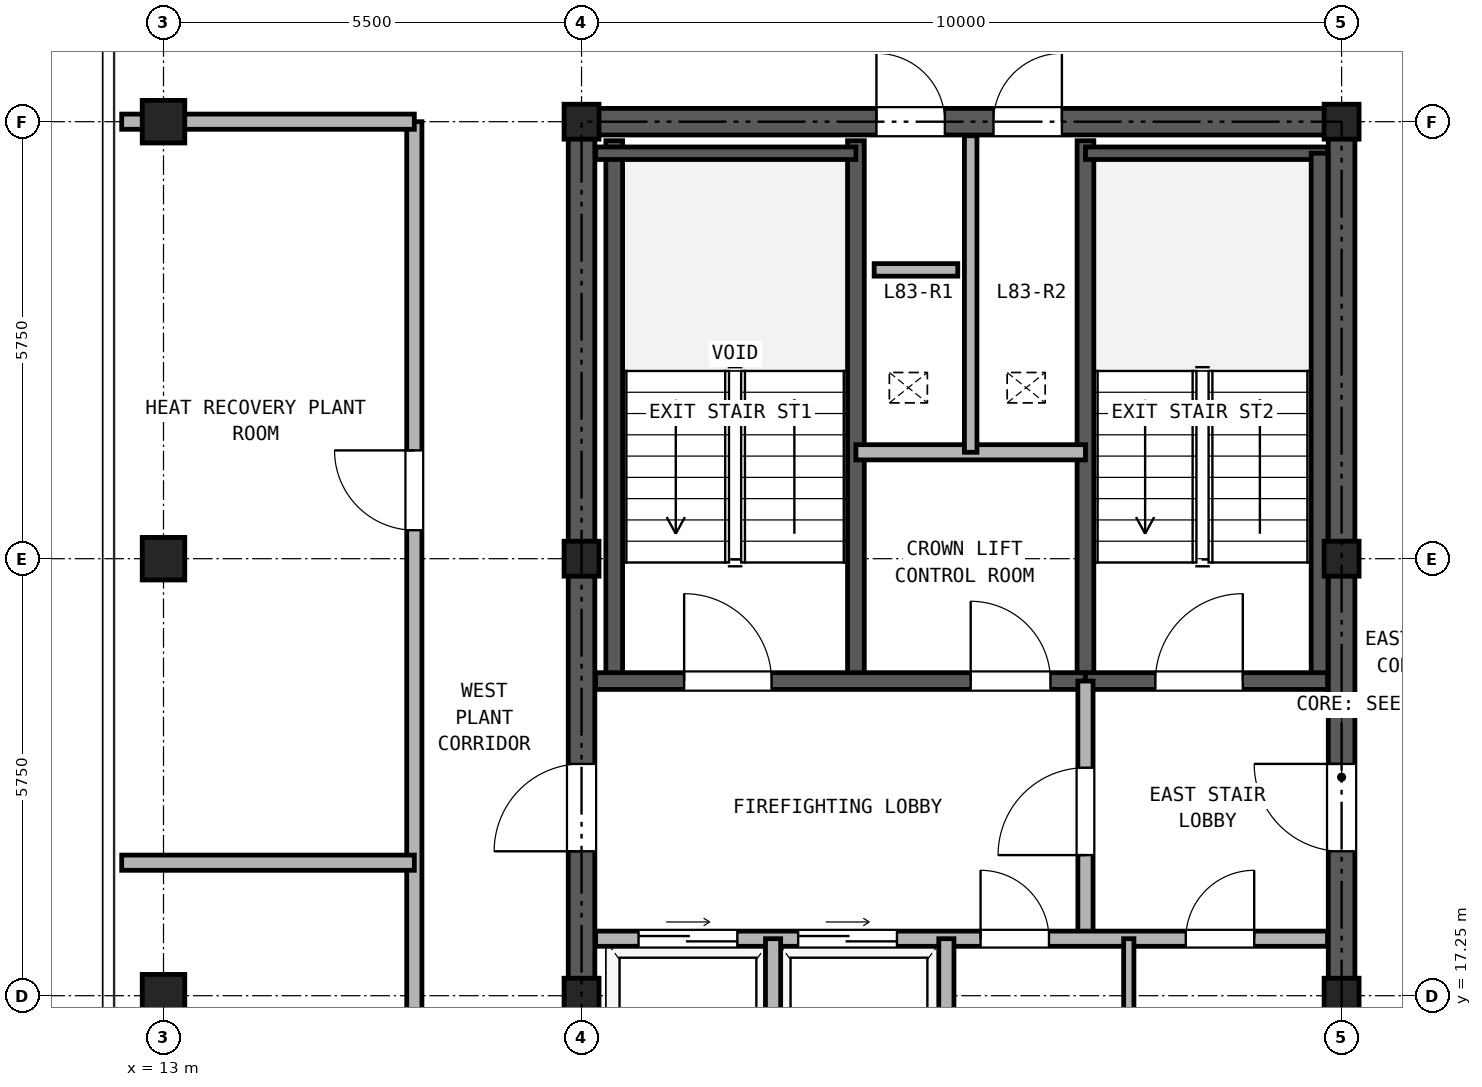
"""IFC4 building model, lengths in metres.
Left out: names, types, materials, properties, quantities, classifications, styles, units other than length and angle.
Written with IfcOpenShell. Run it as: python <this file> out.ifc"""

import sys

from ifc_helpers import new_model, si_unit, direction, frame, frame_2d, origin, origin_2d, place, context, subcontext, project, spatial, rectangle, hollow_rectangle, extrude, source, transform, mapped, element, fill, save


model = new_model("IFC4")
c1 = context("Model", 3, precision=1e-05, world=origin(), true_north=direction((0.0, 1.0)))
c2 = subcontext(c1, "Body", "Model", "MODEL_VIEW")
j1 = project(units=[si_unit("LENGTHUNIT", "METRE"), si_unit("PLANEANGLEUNIT", "RADIAN")], contexts=[c1])
p1 = place(None, origin())
s1 = spatial("IfcSite", under=j1, at=p1, CompositionType="ELEMENT")
p2 = place(p1, origin())
s2 = spatial("IfcBuilding", under=s1, at=p2, CompositionType="ELEMENT")
p3 = place(p2, frame((0.0, 0.0, 289.3)))
s3 = spatial("IfcBuildingStorey", under=s2, at=p3, CompositionType="ELEMENT", Elevation=289.3)
m1 = source(origin(), c2, "Body", "SweptSolid", [
    extrude(hollow_rectangle(XDim=0.56, YDim=0.56, WallThickness=0.03, at=origin_2d()), origin(), (0.0, 0.0, 1.0), 3.38),
])
for number, where, z_axis, x_axis in (
    (1, (13.0, 17.25, 0.0), (0.0, 0.0, 1.0), (1.0, 0.0, 0.0)),
    (2, (13.0, 23.0, 0.0), (0.0, 0.0, 1.0), (1.0, 0.0, 0.0)),
    (3, (13.0, 28.75, 0.0), (0.0, 0.0, 1.0), (1.0, 0.0, 0.0)),
):
    element("IfcColumn", number, at=place(p3, frame(where, z_axis=z_axis, x_axis=x_axis)), inside=s3, PredefinedType="COLUMN", context=c2, shape_type="MappedRepresentation", body=[
        mapped(m1, transform((0.0, 0.0, 0.0), x_axis=(1.0, 0.0, 0.0), y_axis=(0.0, 1.0, 0.0), z_axis=(0.0, 0.0, 1.0), scale=1.0)),
    ])
m2 = source(origin(), c2, "Body", "SweptSolid", [
    extrude(hollow_rectangle(XDim=0.46, YDim=0.46, WallThickness=0.025, at=origin_2d()), origin(), (0.0, 0.0, 1.0), 3.38),
])
for number, where, z_axis, x_axis in (
    (4, (18.5, 17.25, 0.0), (0.0, 0.0, 1.0), (1.0, 0.0, 0.0)),
    (5, (18.5, 23.0, 0.0), (0.0, 0.0, 1.0), (1.0, 0.0, 0.0)),
    (6, (18.5, 28.75, 0.0), (0.0, 0.0, 1.0), (1.0, 0.0, 0.0)),
    (7, (28.5, 17.25, 0.0), (0.0, 0.0, 1.0), (1.0, 0.0, 0.0)),
    (8, (28.5, 23.0, 0.0), (0.0, 0.0, 1.0), (1.0, 0.0, 0.0)),
    (9, (28.5, 28.75, 0.0), (0.0, 0.0, 1.0), (1.0, 0.0, 0.0)),
):
    element("IfcColumn", number, at=place(p3, frame(where, z_axis=z_axis, x_axis=x_axis)), inside=s3, PredefinedType="COLUMN", context=c2, shape_type="MappedRepresentation", body=[
        mapped(m2, transform((0.0, 0.0, 0.0), x_axis=(1.0, 0.0, 0.0), y_axis=(0.0, 1.0, 0.0), z_axis=(0.0, 0.0, 1.0), scale=1.0)),
    ])
p4 = place(p3, frame((18.325, 28.75, 0.0), z_axis=(0.0, 0.0, 1.0), x_axis=(1.0, 0.0, 0.0)))
e10 = element("IfcWall", 10, at=p4, inside=s3, PredefinedType="SHEAR", context=c2, shape_type="SweptSolid", body=[
    extrude(rectangle(XDim=10.35, YDim=0.35, at=frame_2d((5.175, 0.0))), origin(), (0.0, 0.0, 1.0), 3.38),
])
p5 = place(p4, frame((4.055, 0.0, 0.0)))
e11 = element("IfcOpeningElement", 11, at=p5, cuts=e10, PredefinedType="OPENING", context=c2, shape_type="SweptSolid", body=[
    extrude(rectangle(XDim=0.9, YDim=2.05, at=frame_2d((0.45, 1.025))), frame((0.0, 0.185, 0.0), z_axis=(0.0, -1.0, 0.0), x_axis=(1.0, 0.0, 0.0)), (0.0, 0.0, 1.0), 0.37),
])
p6 = place(p4, frame((5.595, 0.0, 0.0)))
e12 = element("IfcOpeningElement", 12, at=p6, cuts=e10, PredefinedType="OPENING", context=c2, shape_type="SweptSolid", body=[
    extrude(rectangle(XDim=0.9, YDim=2.05, at=frame_2d((0.45, 1.025))), frame((0.0, 0.185, 0.0), z_axis=(0.0, -1.0, 0.0), x_axis=(1.0, 0.0, 0.0)), (0.0, 0.0, 1.0), 0.37),
])
p7 = place(p3, frame((18.5, 11.675, 0.0), z_axis=(0.0, 0.0, 1.0), x_axis=(0.0, 1.0, 0.0)))
e13 = element("IfcWall", 13, at=p7, inside=s3, PredefinedType="SHEAR", context=c2, shape_type="SweptSolid", body=[
    extrude(rectangle(XDim=16.9, YDim=0.35, at=frame_2d((8.45, 0.0))), origin(), (0.0, 0.0, 1.0), 3.38),
])
p8 = place(p7, frame((7.475, 0.0, 0.0)))
e14 = element("IfcOpeningElement", 14, at=p8, cuts=e13, PredefinedType="OPENING", context=c2, shape_type="SweptSolid", body=[
    extrude(rectangle(XDim=1.15, YDim=2.2, at=frame_2d((0.575, 1.1))), frame((0.0, 0.185, 0.0), z_axis=(0.0, -1.0, 0.0), x_axis=(1.0, 0.0, 0.0)), (0.0, 0.0, 1.0), 0.37),
])
p9 = place(p3, frame((28.5, 11.675, 0.0), z_axis=(0.0, 0.0, 1.0), x_axis=(0.0, 1.0, 0.0)))
e15 = element("IfcWall", 15, at=p9, inside=s3, PredefinedType="SHEAR", context=c2, shape_type="SweptSolid", body=[
    extrude(rectangle(XDim=16.9, YDim=0.35, at=frame_2d((8.45, 0.0))), origin(), (0.0, 0.0, 1.0), 3.38),
])
p10 = place(p9, frame((7.475, 0.0, 0.0)))
e16 = element("IfcOpeningElement", 16, at=p10, cuts=e15, PredefinedType="OPENING", context=c2, shape_type="SweptSolid", body=[
    extrude(rectangle(XDim=1.15, YDim=2.2, at=frame_2d((0.575, 1.1))), frame((0.0, 0.185, 0.0), z_axis=(0.0, -1.0, 0.0), x_axis=(1.0, 0.0, 0.0)), (0.0, 0.0, 1.0), 0.37),
])
for number, where, z_axis, x_axis in (
    (17, (18.93, 21.39, 0.0), (0.0, 0.0, 1.0), (0.0, 1.0, 0.0)),
    (18, (22.11, 21.39, 0.0), (0.0, 0.0, 1.0), (0.0, 1.0, 0.0)),
    (19, (25.13, 21.39, 0.0), (0.0, 0.0, 1.0), (0.0, 1.0, 0.0)),
):
    element("IfcWall", number, at=place(p3, frame(where, z_axis=z_axis, x_axis=x_axis)), inside=s3, PredefinedType="SOLIDWALL", context=c2, shape_type="SweptSolid", body=[
        extrude(rectangle(XDim=7.11, YDim=0.22, at=frame_2d((3.555, 0.0))), origin(), (0.0, 0.0, 1.0), 3.38),
    ])
p11 = place(p3, frame((18.685, 28.335, 0.0), z_axis=(0.0, 0.0, 1.0), x_axis=(1.0, 0.0, 0.0)))
e20 = element("IfcWall", 20, at=p11, inside=s3, PredefinedType="PARTITIONING", context=c2, shape_type="SweptSolid", body=[
    extrude(rectangle(XDim=3.425, YDim=0.165, at=frame_2d((1.712, 0.0))), origin(), (0.0, 0.0, 1.0), 3.38),
])
p12 = place(p3, frame((25.13, 28.335, 0.0), z_axis=(0.0, 0.0, 1.0), x_axis=(1.0, 0.0, 0.0)))
e21 = element("IfcWall", 21, at=p12, inside=s3, PredefinedType="PARTITIONING", context=c2, shape_type="SweptSolid", body=[
    extrude(rectangle(XDim=3.185, YDim=0.165, at=frame_2d((1.593, 0.0))), origin(), (0.0, 0.0, 1.0), 3.38),
])
p13 = place(p3, frame((28.21, 21.39, 0.0), z_axis=(0.0, 0.0, 1.0), x_axis=(0.0, 1.0, 0.0)))
e22 = element("IfcWall", 22, at=p13, inside=s3, PredefinedType="SOLIDWALL", context=c2, shape_type="SweptSolid", body=[
    extrude(rectangle(XDim=6.945, YDim=0.22, at=frame_2d((3.473, 0.0))), origin(), (0.0, 0.0, 1.0), 3.38),
])
p14 = place(p3, frame((18.685, 21.39, 0.0), z_axis=(0.0, 0.0, 1.0), x_axis=(1.0, 0.0, 0.0)))
e23 = element("IfcWall", 23, at=p14, inside=s3, PredefinedType="SOLIDWALL", context=c2, shape_type="SweptSolid", body=[
    extrude(rectangle(XDim=6.445, YDim=0.22, at=frame_2d((3.222, 0.0))), origin(), (0.0, 0.0, 1.0), 3.38),
])
p15 = place(p14, frame((1.165, 0.0, 0.0)))
e24 = element("IfcOpeningElement", 24, at=p15, cuts=e23, PredefinedType="OPENING", context=c2, shape_type="SweptSolid", body=[
    extrude(rectangle(XDim=1.15, YDim=2.2, at=frame_2d((0.575, 1.1))), frame((0.0, 0.12, 0.0), z_axis=(0.0, -1.0, 0.0), x_axis=(1.0, 0.0, 0.0)), (0.0, 0.0, 1.0), 0.24),
])
p16 = place(p14, frame((4.935, 0.0, 0.0)))
e25 = element("IfcOpeningElement", 25, at=p16, cuts=e23, PredefinedType="OPENING", context=c2, shape_type="SweptSolid", body=[
    extrude(rectangle(XDim=1.05, YDim=2.15, at=frame_2d((0.525, 1.075))), frame((0.0, 0.12, 0.0), z_axis=(0.0, -1.0, 0.0), x_axis=(1.0, 0.0, 0.0)), (0.0, 0.0, 1.0), 0.24),
])
p17 = place(p3, frame((25.13, 21.39, 0.0), z_axis=(0.0, 0.0, 1.0), x_axis=(1.0, 0.0, 0.0)))
e26 = element("IfcWall", 26, at=p17, inside=s3, PredefinedType="SOLIDWALL", context=c2, shape_type="SweptSolid", body=[
    extrude(rectangle(XDim=3.185, YDim=0.22, at=frame_2d((1.593, 0.0))), origin(), (0.0, 0.0, 1.0), 3.38),
])
p18 = place(p17, frame((0.92, 0.0, 0.0)))
e27 = element("IfcOpeningElement", 27, at=p18, cuts=e26, PredefinedType="OPENING", context=c2, shape_type="SweptSolid", body=[
    extrude(rectangle(XDim=1.15, YDim=2.2, at=frame_2d((0.575, 1.1))), frame((0.0, 0.12, 0.0), z_axis=(0.0, -1.0, 0.0), x_axis=(1.0, 0.0, 0.0)), (0.0, 0.0, 1.0), 0.24),
])
p19 = place(p3, frame((22.11, 24.4, 0.0), z_axis=(0.0, 0.0, 1.0), x_axis=(1.0, 0.0, 0.0)))
e28 = element("IfcWall", 28, at=p19, inside=s3, PredefinedType="PARTITIONING", context=c2, shape_type="SweptSolid", body=[
    extrude(rectangle(XDim=3.02, YDim=0.2, at=frame_2d((1.51, 0.0))), origin(), (0.0, 0.0, 1.0), 3.38),
])
p20 = place(p3, frame((23.62, 24.4, 0.0), z_axis=(0.0, 0.0, 1.0), x_axis=(0.0, 1.0, 0.0)))
e29 = element("IfcWall", 29, at=p20, inside=s3, PredefinedType="PARTITIONING", context=c2, shape_type="SweptSolid", body=[
    extrude(rectangle(XDim=4.165, YDim=0.165, at=frame_2d((2.083, 0.0))), origin(), (0.0, 0.0, 1.0), 3.38),
])
p21 = place(p3, frame((25.13, 18.0, 0.0), z_axis=(0.0, 0.0, 1.0), x_axis=(0.0, 1.0, 0.0)))
e30 = element("IfcWall", 30, at=p21, inside=s3, PredefinedType="PARTITIONING", context=c2, shape_type="SweptSolid", body=[
    extrude(rectangle(XDim=3.39, YDim=0.2, at=frame_2d((1.695, 0.0))), origin(), (0.0, 0.0, 1.0), 3.38),
])
p22 = place(p21, frame((1.1, 0.0, 0.0)))
e31 = element("IfcOpeningElement", 31, at=p22, cuts=e30, PredefinedType="OPENING", context=c2, shape_type="SweptSolid", body=[
    extrude(rectangle(XDim=1.15, YDim=2.2, at=frame_2d((0.575, 1.1))), frame((0.0, 0.11, 0.0), z_axis=(0.0, -1.0, 0.0), x_axis=(1.0, 0.0, 0.0)), (0.0, 0.0, 1.0), 0.22),
])
p23 = place(p3, frame((18.685, 18.0, 0.0), z_axis=(0.0, 0.0, 1.0), x_axis=(1.0, 0.0, 0.0)))
e32 = element("IfcWall", 32, at=p23, inside=s3, PredefinedType="PARTITIONING", context=c2, shape_type="SweptSolid", body=[
    extrude(rectangle(XDim=9.63, YDim=0.2, at=frame_2d((4.815, 0.0))), origin(), (0.0, 0.0, 1.0), 3.38),
])
p24 = place(p23, frame((0.565, 0.0, 0.0)))
e33 = element("IfcOpeningElement", 33, at=p24, cuts=e32, PredefinedType="OPENING", context=c2, shape_type="SweptSolid", body=[
    extrude(rectangle(XDim=1.3, YDim=2.3, at=frame_2d((0.65, 1.15))), frame((0.0, 0.11, 0.0), z_axis=(0.0, -1.0, 0.0), x_axis=(1.0, 0.0, 0.0)), (0.0, 0.0, 1.0), 0.22),
])
p25 = place(p23, frame((2.665, 0.0, 0.0)))
e34 = element("IfcOpeningElement", 34, at=p25, cuts=e32, PredefinedType="OPENING", context=c2, shape_type="SweptSolid", body=[
    extrude(rectangle(XDim=1.3, YDim=2.3, at=frame_2d((0.65, 1.15))), frame((0.0, 0.11, 0.0), z_axis=(0.0, -1.0, 0.0), x_axis=(1.0, 0.0, 0.0)), (0.0, 0.0, 1.0), 0.22),
])
p26 = place(p23, frame((5.065, 0.0, 0.0)))
e35 = element("IfcOpeningElement", 35, at=p26, cuts=e32, PredefinedType="OPENING", context=c2, shape_type="SweptSolid", body=[
    extrude(rectangle(XDim=0.9, YDim=2.05, at=frame_2d((0.45, 1.025))), frame((0.0, 0.11, 0.0), z_axis=(0.0, -1.0, 0.0), x_axis=(1.0, 0.0, 0.0)), (0.0, 0.0, 1.0), 0.22),
])
p27 = place(p23, frame((7.765, 0.0, 0.0)))
e36 = element("IfcOpeningElement", 36, at=p27, cuts=e32, PredefinedType="OPENING", context=c2, shape_type="SweptSolid", body=[
    extrude(rectangle(XDim=0.9, YDim=2.05, at=frame_2d((0.45, 1.025))), frame((0.0, 0.11, 0.0), z_axis=(0.0, -1.0, 0.0), x_axis=(1.0, 0.0, 0.0)), (0.0, 0.0, 1.0), 0.22),
])
for number, where, z_axis, x_axis in (
    (37, (21.02, 15.0, 0.0), (0.0, 0.0, 1.0), (0.0, 1.0, 0.0)),
    (38, (23.3, 15.0, 0.0), (0.0, 0.0, 1.0), (0.0, 1.0, 0.0)),
):
    element("IfcWall", number, at=place(p3, frame(where, z_axis=z_axis, x_axis=x_axis)), inside=s3, PredefinedType="PARTITIONING", context=c2, shape_type="SweptSolid", body=[
        extrude(rectangle(XDim=3.0, YDim=0.2, at=frame_2d((1.5, 0.0))), origin(), (0.0, 0.0, 1.0), 3.38),
    ])
p28 = place(p3, frame((25.7, 15.0, 0.0), z_axis=(0.0, 0.0, 1.0), x_axis=(0.0, 1.0, 0.0)))
e39 = element("IfcWall", 39, at=p28, inside=s3, PredefinedType="PARTITIONING", context=c2, shape_type="SweptSolid", body=[
    extrude(rectangle(XDim=3.0, YDim=0.135, at=frame_2d((1.5, 0.0))), origin(), (0.0, 0.0, 1.0), 3.38),
])
p29 = place(p3, frame((16.3, 8.9, 0.0), z_axis=(0.0, 0.0, 1.0), x_axis=(0.0, 1.0, 0.0)))
e40 = element("IfcWall", 40, at=p29, inside=s3, PredefinedType="PARTITIONING", context=c2, shape_type="SweptSolid", body=[
    extrude(rectangle(XDim=19.85, YDim=0.2, at=frame_2d((9.925, 0.0))), origin(), (0.0, 0.0, 1.0), 3.38),
])
p30 = place(p29, frame((4.55, 0.0, 0.0)))
e41 = element("IfcOpeningElement", 41, at=p30, cuts=e40, PredefinedType="OPENING", context=c2, shape_type="SweptSolid", body=[
    extrude(rectangle(XDim=1.05, YDim=2.15, at=frame_2d((0.525, 1.075))), frame((0.0, 0.11, 0.0), z_axis=(0.0, -1.0, 0.0), x_axis=(1.0, 0.0, 0.0)), (0.0, 0.0, 1.0), 0.22),
])
p31 = place(p29, frame((14.475, 0.0, 0.0)))
e42 = element("IfcOpeningElement", 42, at=p31, cuts=e40, PredefinedType="OPENING", context=c2, shape_type="SweptSolid", body=[
    extrude(rectangle(XDim=1.05, YDim=2.15, at=frame_2d((0.525, 1.075))), frame((0.0, 0.11, 0.0), z_axis=(0.0, -1.0, 0.0), x_axis=(1.0, 0.0, 0.0)), (0.0, 0.0, 1.0), 0.22),
])
p32 = place(p3, frame((12.45, 28.75, 0.0), z_axis=(0.0, 0.0, 1.0), x_axis=(1.0, 0.0, 0.0)))
e43 = element("IfcWall", 43, at=p32, inside=s3, PredefinedType="PARTITIONING", context=c2, shape_type="SweptSolid", body=[
    extrude(rectangle(XDim=3.85, YDim=0.2, at=frame_2d((1.925, 0.0))), origin(), (0.0, 0.0, 1.0), 2.905),
])
p33 = place(p3, frame((12.45, 19.0, 0.0), z_axis=(0.0, 0.0, 1.0), x_axis=(1.0, 0.0, 0.0)))
e44 = element("IfcWall", 44, at=p33, inside=s3, PredefinedType="PARTITIONING", context=c2, shape_type="SweptSolid", body=[
    extrude(rectangle(XDim=3.85, YDim=0.2, at=frame_2d((1.925, 0.0))), origin(), (0.0, 0.0, 1.0), 3.38),
])
p34 = place(p3, frame((22.35, 26.8, 0.0), z_axis=(0.0, 0.0, 1.0), x_axis=(1.0, 0.0, 0.0)))
e45 = element("IfcWall", 45, at=p34, inside=s3, PredefinedType="PARTITIONING", context=c2, shape_type="SweptSolid", body=[
    extrude(rectangle(XDim=1.1, YDim=0.165, at=frame_2d((0.55, 0.0))), origin(), (0.0, 0.0, 1.0), 3.38),
])
p35 = place(p15, frame((1.15, 0.0, 0.0), z_axis=(0.0, 0.0, 1.0), x_axis=(-1.0, 0.0, 0.0)))
e46 = element("IfcDoor", 46, at=p35, inside=s3, OperationType="SINGLE_SWING_LEFT", PredefinedType="DOOR", context=c2, shape_type="SweptSolid", body=[
    extrude(rectangle(XDim=1.15, YDim=2.2, at=frame_2d((0.575, 1.1))), frame((0.0, 0.025, 0.0), z_axis=(0.0, -1.0, 0.0), x_axis=(1.0, 0.0, 0.0)), (0.0, 0.0, 1.0), 0.05),
])
fill(e24, e46)
p36 = place(p18, frame((1.15, 0.0, 0.0), z_axis=(0.0, 0.0, 1.0), x_axis=(-1.0, 0.0, 0.0)))
e47 = element("IfcDoor", 47, at=p36, inside=s3, OperationType="SINGLE_SWING_RIGHT", PredefinedType="DOOR", context=c2, shape_type="SweptSolid", body=[
    extrude(rectangle(XDim=1.15, YDim=2.2, at=frame_2d((0.575, 1.1))), frame((0.0, 0.025, 0.0), z_axis=(0.0, -1.0, 0.0), x_axis=(1.0, 0.0, 0.0)), (0.0, 0.0, 1.0), 0.05),
])
fill(e27, e47)
p37 = place(p16, origin())
e48 = element("IfcDoor", 48, at=p37, inside=s3, OperationType="SINGLE_SWING_LEFT", PredefinedType="DOOR", context=c2, shape_type="SweptSolid", body=[
    extrude(rectangle(XDim=1.05, YDim=2.15, at=frame_2d((0.525, 1.075))), frame((0.0, 0.025, 0.0), z_axis=(0.0, -1.0, 0.0), x_axis=(1.0, 0.0, 0.0)), (0.0, 0.0, 1.0), 0.05),
])
fill(e25, e48)
p38 = place(p22, origin())
e49 = element("IfcDoor", 49, at=p38, inside=s3, OperationType="SINGLE_SWING_LEFT", PredefinedType="DOOR", context=c2, shape_type="SweptSolid", body=[
    extrude(rectangle(XDim=1.15, YDim=2.2, at=frame_2d((0.575, 1.1))), frame((0.0, 0.025, 0.0), z_axis=(0.0, -1.0, 0.0), x_axis=(1.0, 0.0, 0.0)), (0.0, 0.0, 1.0), 0.05),
])
fill(e31, e49)
p39 = place(p24, origin())
e50 = element("IfcDoor", 50, at=p39, inside=s3, OperationType="DOUBLE_DOOR_SLIDING", PredefinedType="DOOR", context=c2, shape_type="SweptSolid", body=[
    extrude(rectangle(XDim=1.3, YDim=2.3, at=frame_2d((0.65, 1.15))), frame((0.0, 0.025, 0.0), z_axis=(0.0, -1.0, 0.0), x_axis=(1.0, 0.0, 0.0)), (0.0, 0.0, 1.0), 0.05),
])
fill(e33, e50)
p40 = place(p25, origin())
e51 = element("IfcDoor", 51, at=p40, inside=s3, OperationType="DOUBLE_DOOR_SLIDING", PredefinedType="DOOR", context=c2, shape_type="SweptSolid", body=[
    extrude(rectangle(XDim=1.3, YDim=2.3, at=frame_2d((0.65, 1.15))), frame((0.0, 0.025, 0.0), z_axis=(0.0, -1.0, 0.0), x_axis=(1.0, 0.0, 0.0)), (0.0, 0.0, 1.0), 0.05),
])
fill(e34, e51)
p41 = place(p26, frame((0.9, 0.0, 0.0), z_axis=(0.0, 0.0, 1.0), x_axis=(-1.0, 0.0, 0.0)))
e52 = element("IfcDoor", 52, at=p41, inside=s3, OperationType="SINGLE_SWING_LEFT", PredefinedType="DOOR", context=c2, shape_type="SweptSolid", body=[
    extrude(rectangle(XDim=0.9, YDim=2.05, at=frame_2d((0.45, 1.025))), frame((0.0, 0.025, 0.0), z_axis=(0.0, -1.0, 0.0), x_axis=(1.0, 0.0, 0.0)), (0.0, 0.0, 1.0), 0.05),
])
fill(e35, e52)
p42 = place(p27, frame((0.9, 0.0, 0.0), z_axis=(0.0, 0.0, 1.0), x_axis=(-1.0, 0.0, 0.0)))
e53 = element("IfcDoor", 53, at=p42, inside=s3, OperationType="SINGLE_SWING_RIGHT", PredefinedType="DOOR", context=c2, shape_type="SweptSolid", body=[
    extrude(rectangle(XDim=0.9, YDim=2.05, at=frame_2d((0.45, 1.025))), frame((0.0, 0.025, 0.0), z_axis=(0.0, -1.0, 0.0), x_axis=(1.0, 0.0, 0.0)), (0.0, 0.0, 1.0), 0.05),
])
fill(e36, e53)
p43 = place(p8, frame((1.15, 0.0, 0.0), z_axis=(0.0, 0.0, 1.0), x_axis=(-1.0, 0.0, 0.0)))
e54 = element("IfcDoor", 54, at=p43, inside=s3, OperationType="SINGLE_SWING_LEFT", PredefinedType="DOOR", context=c2, shape_type="SweptSolid", body=[
    extrude(rectangle(XDim=1.15, YDim=2.2, at=frame_2d((0.575, 1.1))), frame((0.0, 0.025, 0.0), z_axis=(0.0, -1.0, 0.0), x_axis=(1.0, 0.0, 0.0)), (0.0, 0.0, 1.0), 0.05),
])
fill(e14, e54)
p44 = place(p10, origin())
e55 = element("IfcDoor", 55, at=p44, inside=s3, OperationType="SINGLE_SWING_RIGHT", PredefinedType="DOOR", context=c2, shape_type="SweptSolid", body=[
    extrude(rectangle(XDim=1.15, YDim=2.2, at=frame_2d((0.575, 1.1))), frame((0.0, 0.025, 0.0), z_axis=(0.0, -1.0, 0.0), x_axis=(1.0, 0.0, 0.0)), (0.0, 0.0, 1.0), 0.05),
])
fill(e16, e55)
p45 = place(p5, origin())
e56 = element("IfcDoor", 56, at=p45, inside=s3, OperationType="SINGLE_SWING_LEFT", PredefinedType="DOOR", context=c2, shape_type="SweptSolid", body=[
    extrude(rectangle(XDim=0.9, YDim=2.05, at=frame_2d((0.45, 1.025))), frame((0.0, 0.025, 0.0), z_axis=(0.0, -1.0, 0.0), x_axis=(1.0, 0.0, 0.0)), (0.0, 0.0, 1.0), 0.05),
])
fill(e11, e56)
p46 = place(p6, origin())
e57 = element("IfcDoor", 57, at=p46, inside=s3, OperationType="SINGLE_SWING_RIGHT", PredefinedType="DOOR", context=c2, shape_type="SweptSolid", body=[
    extrude(rectangle(XDim=0.9, YDim=2.05, at=frame_2d((0.45, 1.025))), frame((0.0, 0.025, 0.0), z_axis=(0.0, -1.0, 0.0), x_axis=(1.0, 0.0, 0.0)), (0.0, 0.0, 1.0), 0.05),
])
fill(e12, e57)
p47 = place(p31, frame((1.05, 0.0, 0.0), z_axis=(0.0, 0.0, 1.0), x_axis=(-1.0, 0.0, 0.0)))
e58 = element("IfcDoor", 58, at=p47, inside=s3, OperationType="SINGLE_SWING_RIGHT", PredefinedType="DOOR", context=c2, shape_type="SweptSolid", body=[
    extrude(rectangle(XDim=1.05, YDim=2.15, at=frame_2d((0.525, 1.075))), frame((0.0, 0.025, 0.0), z_axis=(0.0, -1.0, 0.0), x_axis=(1.0, 0.0, 0.0)), (0.0, 0.0, 1.0), 0.05),
])
fill(e42, e58)
save(model, sys.argv[1])
